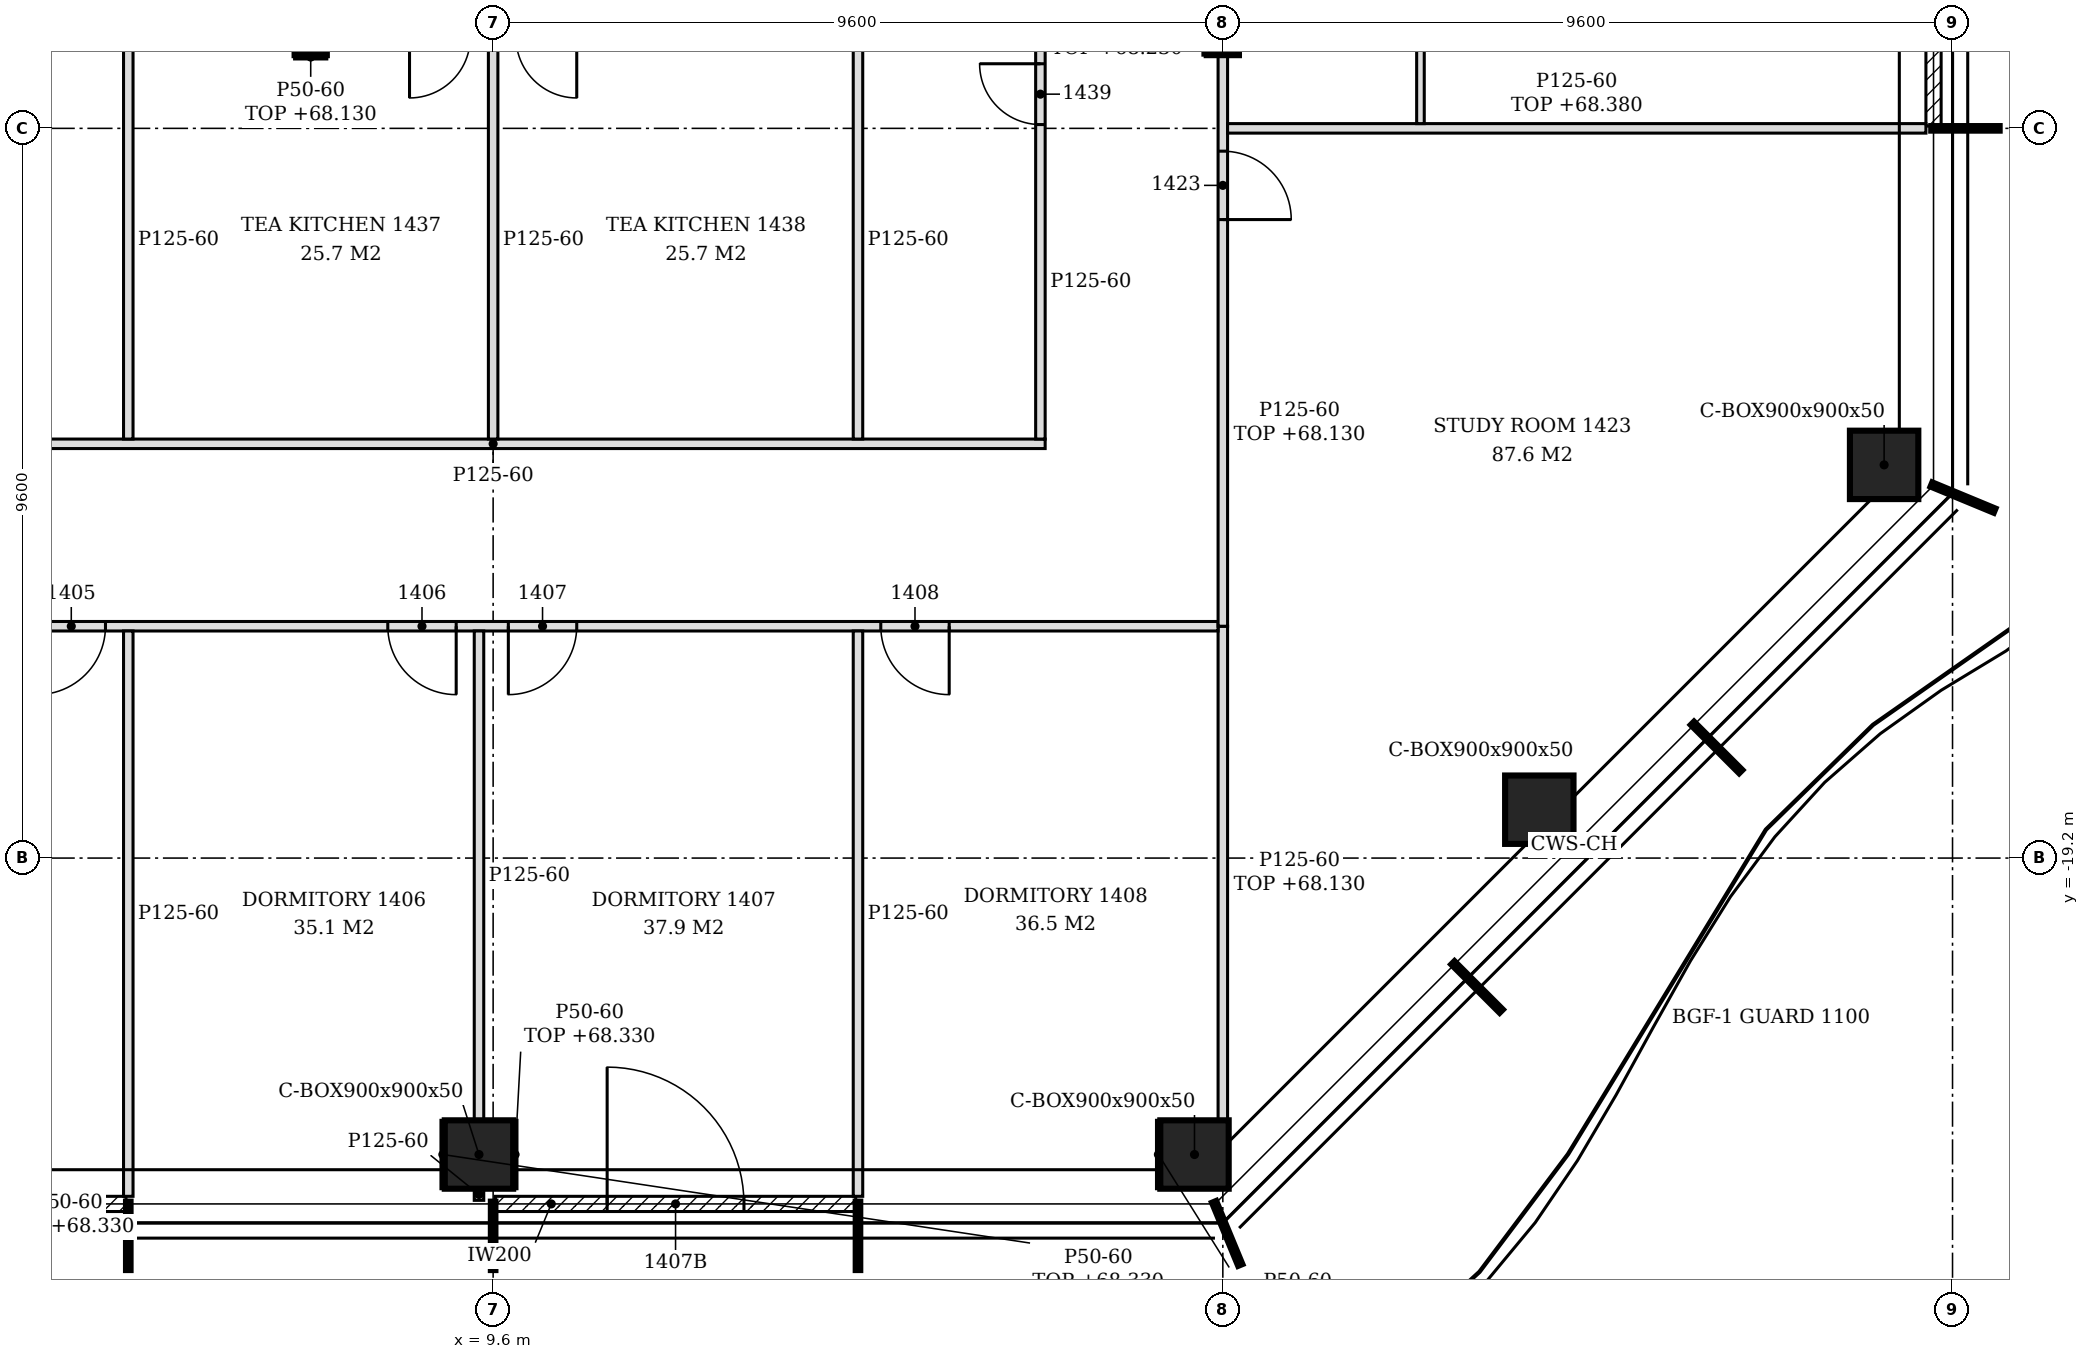
"""IFC4 building model, lengths in metres.
Left out: names, types, materials, properties, quantities, classifications, styles, units other than length and angle.
Written with IfcOpenShell. Run it as: python <this file> out.ifc"""

import sys

from ifc_helpers import new_model, si_unit, direction, frame, frame_2d, origin, origin_2d, place, context, subcontext, project, spatial, polyline, rectangle, hollow_rectangle, i_section, outline, extrude, element, fill, save


model = new_model("IFC4")
c1 = context("Model", 3, precision=1e-05, world=origin(), true_north=direction((0.0, 1.0)))
c2 = subcontext(c1, "Body", "Model", "MODEL_VIEW")
j1 = project(units=[si_unit("LENGTHUNIT", "METRE"), si_unit("PLANEANGLEUNIT", "RADIAN")], contexts=[c1])
p1 = place(None, origin())
s1 = spatial("IfcSite", under=j1, at=p1, CompositionType="ELEMENT")
p2 = place(p1, origin())
s2 = spatial("IfcBuilding", under=s1, at=p2, CompositionType="ELEMENT")
p3 = place(p2, frame((0.0, 0.0, 65.4)))
s3 = spatial("IfcBuildingStorey", under=s2, at=p3, CompositionType="ELEMENT", Elevation=65.4)
for number, where, z_axis, x_axis in (
    (1, (9.414, -23.1, -0.15), (0.0, 0.0, 1.0), (1.0, 0.0, 0.0)),
    (2, (18.827, -23.1, -0.15), (0.0, 0.0, 1.0), (1.0, 0.0, 0.0)),
    (3, (23.364, -18.564, -0.15), (0.0, 0.0, 1.0), (1.0, 0.0, 0.0)),
    (4, (27.9, -14.027, -0.15), (0.0, 0.0, 1.0), (1.0, 0.0, 0.0)),
):
    element("IfcColumn", number, at=place(p3, frame(where, z_axis=z_axis, x_axis=x_axis)), inside=s3, PredefinedType="COLUMN", context=c2, shape_type="SweptSolid", body=[
        extrude(hollow_rectangle(XDim=0.9, YDim=0.9, WallThickness=0.05, at=origin_2d()), origin(), (0.0, 0.0, 1.0), 3.6),
    ])
for number, where, z_axis, x_axis in (
    (5, (7.2, -8.4, -0.15), (0.0, 0.0, 1.0), (1.0, 0.0, 0.0)),
    (6, (19.2, -8.4, -0.15), (0.0, 0.0, 1.0), (1.0, 0.0, 0.0)),
):
    element("IfcColumn", number, at=place(p3, frame(where, z_axis=z_axis, x_axis=x_axis)), inside=s3, PredefinedType="COLUMN", context=c2, shape_type="SweptSolid", body=[
        extrude(i_section(OverallWidth=0.424, OverallDepth=0.474, WebThickness=0.048, FlangeThickness=0.077, FilletRadius=0.015, at=origin_2d()), origin(), (0.0, 0.0, 1.0), 3.6),
    ])
p4 = place(p3, frame((0.03, -23.75, 0.0), z_axis=(0.0, 0.0, 1.0), x_axis=(1.0, 0.0, 0.0)))
e7 = element("IfcWall", 7, at=p4, inside=s3, PredefinedType="NOTDEFINED", context=c2, shape_type="SweptSolid", body=[
    extrude(rectangle(XDim=4.74, YDim=0.2, at=frame_2d((2.37, 0.0))), origin(), (0.0, 0.0, 1.0), 3.45),
])
p5 = place(p4, frame((1.47, 0.0, 0.0)))
e8 = element("IfcOpeningElement", 8, at=p5, cuts=e7, PredefinedType="OPENING", context=c2, shape_type="SweptSolid", body=[
    extrude(rectangle(XDim=1.8, YDim=2.4, at=frame_2d((0.9, 1.2))), frame((0.0, 0.11, 0.0), z_axis=(0.0, -1.0, 0.0), x_axis=(1.0, 0.0, 0.0)), (0.0, 0.0, 1.0), 0.22),
])
p6 = place(p3, frame((9.63, -23.75, 0.0), z_axis=(0.0, 0.0, 1.0), x_axis=(1.0, 0.0, 0.0)))
e9 = element("IfcWall", 9, at=p6, inside=s3, PredefinedType="NOTDEFINED", context=c2, shape_type="SweptSolid", body=[
    extrude(rectangle(XDim=4.74, YDim=0.2, at=frame_2d((2.37, 0.0))), origin(), (0.0, 0.0, 1.0), 3.45),
])
p7 = place(p6, frame((1.47, 0.0, 0.0)))
e10 = element("IfcOpeningElement", 10, at=p7, cuts=e9, PredefinedType="OPENING", context=c2, shape_type="SweptSolid", body=[
    extrude(rectangle(XDim=1.8, YDim=2.4, at=frame_2d((0.9, 1.2))), frame((0.0, 0.11, 0.0), z_axis=(0.0, -1.0, 0.0), x_axis=(1.0, 0.0, 0.0)), (0.0, 0.0, 1.0), 0.22),
])
p8 = place(p3, frame((28.55, -9.57, 0.0), z_axis=(0.0, 0.0, 1.0), x_axis=(0.0, 1.0, 0.0)))
e11 = element("IfcWall", 11, at=p8, inside=s3, PredefinedType="NOTDEFINED", context=c2, shape_type="SweptSolid", body=[
    extrude(rectangle(XDim=4.74, YDim=0.2, at=frame_2d((2.37, 0.0))), origin(), (0.0, 0.0, 1.0), 3.45),
])
p9 = place(p8, frame((1.17, 0.0, 0.0)))
e12 = element("IfcOpeningElement", 12, at=p9, cuts=e11, PredefinedType="OPENING", context=c2, shape_type="SweptSolid", body=[
    extrude(rectangle(XDim=2.4, YDim=2.4, at=frame_2d((1.2, 1.2))), frame((0.0, 0.11, 0.0), z_axis=(0.0, -1.0, 0.0), x_axis=(1.0, 0.0, 0.0)), (0.0, 0.0, 1.0), 0.22),
])
p10 = place(p3, frame((4.8, -23.65, 0.0), z_axis=(0.0, 0.0, 1.0), x_axis=(0.0, 1.0, 0.0)))
e13 = element("IfcWall", 13, at=p10, inside=s3, PredefinedType="PARTITIONING", context=c2, shape_type="SweptSolid", body=[
    extrude(outline(polyline([(0.0, 0.0), (7.438, 0.0), (7.438, 3.45), (4.555, 3.45), (4.553, 2.88), (4.345, 2.88), (4.343, 3.45), (0.7, 3.45), (0.698, 2.93), (0.4, 2.93), (0.398, 3.45), (0.0, 3.45), (0.0, 0.0)])), frame((0.0, 0.062, 0.0), z_axis=(0.0, -1.0, 0.0), x_axis=(1.0, 0.0, 0.0)), (0.0, 0.0, 1.0), 0.125),
])
p11 = place(p3, frame((9.414, -23.703, 0.0), z_axis=(0.0, 0.0, 1.0), x_axis=(0.0, 1.0, 0.0)))
e14 = element("IfcWall", 14, at=p11, inside=s3, PredefinedType="PARTITIONING", context=c2, shape_type="SweptSolid", body=[
    extrude(rectangle(XDim=0.153, YDim=0.125, at=frame_2d((0.076, 0.0))), origin(), (0.0, 0.0, 1.0), 3.45),
])
p12 = place(p3, frame((14.4, -23.65, 0.0), z_axis=(0.0, 0.0, 1.0), x_axis=(0.0, 1.0, 0.0)))
e15 = element("IfcWall", 15, at=p12, inside=s3, PredefinedType="PARTITIONING", context=c2, shape_type="SweptSolid", body=[
    extrude(outline(polyline([(0.0, 0.0), (7.438, 0.0), (7.438, 3.45), (4.555, 3.45), (4.553, 2.88), (4.345, 2.88), (4.343, 3.45), (0.7, 3.45), (0.698, 2.93), (0.4, 2.93), (0.398, 3.45), (0.0, 3.45), (0.0, 0.0)])), frame((0.0, 0.062, 0.0), z_axis=(0.0, -1.0, 0.0), x_axis=(1.0, 0.0, 0.0)), (0.0, 0.0, 1.0), 0.125),
])
p13 = place(p3, frame((9.414, -22.65, 0.0), z_axis=(0.0, 0.0, 1.0), x_axis=(0.0, 1.0, 0.0)))
e16 = element("IfcWall", 16, at=p13, inside=s3, PredefinedType="PARTITIONING", context=c2, shape_type="SweptSolid", body=[
    extrude(outline(polyline([(0.0, 0.0), (6.438, 0.0), (6.438, 3.45), (3.555, 3.45), (3.553, 2.88), (3.345, 2.88), (3.343, 3.45), (0.0, 3.45), (0.0, 0.0)])), frame((0.0, 0.062, 0.0), z_axis=(0.0, -1.0, 0.0), x_axis=(1.0, 0.0, 0.0)), (0.0, 0.0, 1.0), 0.125),
])
p14 = place(p3, frame((19.2, -22.65, 0.0), z_axis=(0.0, 0.0, 1.0), x_axis=(0.0, 1.0, 0.0)))
e17 = element("IfcWall", 17, at=p14, inside=s3, PredefinedType="PARTITIONING", context=c2, shape_type="SweptSolid", body=[
    extrude(outline(polyline([(0.0, 0.0), (6.5, 0.0), (6.5, 2.73), (0.48, 2.73), (0.478, 2.63), (0.0, 2.63), (0.0, 0.0)])), frame((0.0, 0.062, 0.0), z_axis=(0.0, -1.0, 0.0), x_axis=(1.0, 0.0, 0.0)), (0.0, 0.0, 1.0), 0.125),
])
p15 = place(p3, frame((-22.55, -16.15, 0.0), z_axis=(0.0, 0.0, 1.0), x_axis=(1.0, 0.0, 0.0)))
e18 = element("IfcWall", 18, at=p15, inside=s3, PredefinedType="PARTITIONING", context=c2, shape_type="SweptSolid", body=[
    extrude(outline(polyline([(0.0, 0.0), (41.688, 0.0), (41.688, 2.73), (41.6, 2.73), (41.598, 3.45), (29.9, 3.45), (29.898, 2.73), (29.6, 2.73), (29.598, 3.45), (17.9, 3.45), (17.898, 2.73), (17.6, 2.73), (17.598, 3.45), (8.3, 3.45), (8.298, 2.93), (8.0, 2.93), (7.998, 3.45), (0.0, 3.45), (0.0, 0.0)])), frame((0.0, 0.062, 0.0), z_axis=(0.0, -1.0, 0.0), x_axis=(1.0, 0.0, 0.0)), (0.0, 0.0, 1.0), 0.125),
])
p16 = place(p15, frame((6.95, 0.0, 0.0)))
e19 = element("IfcOpeningElement", 19, at=p16, cuts=e18, PredefinedType="OPENING", context=c2, shape_type="SweptSolid", body=[
    extrude(rectangle(XDim=0.9, YDim=2.1, at=frame_2d((0.45, 1.05))), frame((0.0, 0.073, 0.0), z_axis=(0.0, -1.0, 0.0), x_axis=(1.0, 0.0, 0.0)), (0.0, 0.0, 1.0), 0.145),
])
p17 = place(p15, frame((11.936, 0.0, 0.0)))
e20 = element("IfcOpeningElement", 20, at=p17, cuts=e18, PredefinedType="OPENING", context=c2, shape_type="SweptSolid", body=[
    extrude(rectangle(XDim=0.9, YDim=2.1, at=frame_2d((0.45, 1.05))), frame((0.0, 0.073, 0.0), z_axis=(0.0, -1.0, 0.0), x_axis=(1.0, 0.0, 0.0)), (0.0, 0.0, 1.0), 0.145),
])
p18 = place(p15, frame((16.55, 0.0, 0.0)))
e21 = element("IfcOpeningElement", 21, at=p18, cuts=e18, PredefinedType="OPENING", context=c2, shape_type="SweptSolid", body=[
    extrude(rectangle(XDim=0.9, YDim=2.1, at=frame_2d((0.45, 1.05))), frame((0.0, 0.073, 0.0), z_axis=(0.0, -1.0, 0.0), x_axis=(1.0, 0.0, 0.0)), (0.0, 0.0, 1.0), 0.145),
])
p19 = place(p15, frame((21.35, 0.0, 0.0)))
e22 = element("IfcOpeningElement", 22, at=p19, cuts=e18, PredefinedType="OPENING", context=c2, shape_type="SweptSolid", body=[
    extrude(rectangle(XDim=0.9, YDim=2.1, at=frame_2d((0.45, 1.05))), frame((0.0, 0.073, 0.0), z_axis=(0.0, -1.0, 0.0), x_axis=(1.0, 0.0, 0.0)), (0.0, 0.0, 1.0), 0.145),
])
p20 = place(p15, frame((26.15, 0.0, 0.0)))
e23 = element("IfcOpeningElement", 23, at=p20, cuts=e18, PredefinedType="OPENING", context=c2, shape_type="SweptSolid", body=[
    extrude(rectangle(XDim=0.9, YDim=2.1, at=frame_2d((0.45, 1.05))), frame((0.0, 0.073, 0.0), z_axis=(0.0, -1.0, 0.0), x_axis=(1.0, 0.0, 0.0)), (0.0, 0.0, 1.0), 0.145),
])
p21 = place(p15, frame((30.764, 0.0, 0.0)))
e24 = element("IfcOpeningElement", 24, at=p21, cuts=e18, PredefinedType="OPENING", context=c2, shape_type="SweptSolid", body=[
    extrude(rectangle(XDim=0.9, YDim=2.1, at=frame_2d((0.45, 1.05))), frame((0.0, 0.073, 0.0), z_axis=(0.0, -1.0, 0.0), x_axis=(1.0, 0.0, 0.0)), (0.0, 0.0, 1.0), 0.145),
])
p22 = place(p15, frame((32.35, 0.0, 0.0)))
e25 = element("IfcOpeningElement", 25, at=p22, cuts=e18, PredefinedType="OPENING", context=c2, shape_type="SweptSolid", body=[
    extrude(rectangle(XDim=0.9, YDim=2.1, at=frame_2d((0.45, 1.05))), frame((0.0, 0.073, 0.0), z_axis=(0.0, -1.0, 0.0), x_axis=(1.0, 0.0, 0.0)), (0.0, 0.0, 1.0), 0.145),
])
p23 = place(p15, frame((37.25, 0.0, 0.0)))
e26 = element("IfcOpeningElement", 26, at=p23, cuts=e18, PredefinedType="OPENING", context=c2, shape_type="SweptSolid", body=[
    extrude(rectangle(XDim=0.9, YDim=2.1, at=frame_2d((0.45, 1.05))), frame((0.0, 0.073, 0.0), z_axis=(0.0, -1.0, 0.0), x_axis=(1.0, 0.0, 0.0)), (0.0, 0.0, 1.0), 0.145),
])
p24 = place(p3, frame((19.2, -16.15, 0.0), z_axis=(0.0, 0.0, 1.0), x_axis=(0.0, 1.0, 0.0)))
e27 = element("IfcWall", 27, at=p24, inside=s3, PredefinedType="PARTITIONING", context=c2, shape_type="SweptSolid", body=[
    extrude(rectangle(XDim=7.513, YDim=0.125, at=frame_2d((3.756, 0.0))), origin(), (0.0, 0.0, 1.0), 2.73),
])
p25 = place(p24, frame((5.35, 0.0, 0.0)))
e28 = element("IfcOpeningElement", 28, at=p25, cuts=e27, PredefinedType="OPENING", context=c2, shape_type="SweptSolid", body=[
    extrude(rectangle(XDim=0.9, YDim=2.1, at=frame_2d((0.45, 1.05))), frame((0.0, 0.073, 0.0), z_axis=(0.0, -1.0, 0.0), x_axis=(1.0, 0.0, 0.0)), (0.0, 0.0, 1.0), 0.145),
])
p26 = place(p3, frame((2.337, -13.75, 0.0), z_axis=(0.0, 0.0, 1.0), x_axis=(1.0, 0.0, 0.0)))
e29 = element("IfcWall", 29, at=p26, inside=s3, PredefinedType="PARTITIONING", context=c2, shape_type="SweptSolid", body=[
    extrude(outline(polyline([(0.0, 0.0), (14.525, 0.0), (14.525, 3.45), (5.012, 3.45), (5.01, 2.73), (4.712, 2.73), (4.71, 3.45), (0.0, 3.45), (0.0, 0.0)])), frame((0.0, 0.062, 0.0), z_axis=(0.0, -1.0, 0.0), x_axis=(1.0, 0.0, 0.0)), (0.0, 0.0, 1.0), 0.125),
])
for number, where, z_axis, x_axis in (
    (30, (4.8, -13.688, 0.0), (0.0, 0.0, 1.0), (0.0, 1.0, 0.0)),
    (31, (9.6, -13.688, 0.0), (0.0, 0.0, 1.0), (0.0, 1.0, 0.0)),
    (32, (14.4, -13.688, 0.0), (0.0, 0.0, 1.0), (0.0, 1.0, 0.0)),
):
    element("IfcWall", number, at=place(p3, frame(where, z_axis=z_axis, x_axis=x_axis)), inside=s3, PredefinedType="PARTITIONING", context=c2, shape_type="SweptSolid", body=[
        extrude(outline(polyline([(0.0, 0.0), (5.225, 0.0), (5.225, 2.83), (5.137, 2.83), (5.135, 3.45), (0.0, 3.45), (0.0, 0.0)])), frame((0.0, 0.062, 0.0), z_axis=(0.0, -1.0, 0.0), x_axis=(1.0, 0.0, 0.0)), (0.0, 0.0, 1.0), 0.125),
    ])
p27 = place(p3, frame((16.8, -13.688, 0.0), z_axis=(0.0, 0.0, 1.0), x_axis=(0.0, 1.0, 0.0)))
e33 = element("IfcWall", 33, at=p27, inside=s3, PredefinedType="PARTITIONING", context=c2, shape_type="SweptSolid", body=[
    extrude(outline(polyline([(0.0, 0.0), (5.225, 0.0), (5.225, 2.83), (5.137, 2.83), (5.135, 3.45), (0.0, 3.45), (0.0, 0.0)])), frame((0.0, 0.062, 0.0), z_axis=(0.0, -1.0, 0.0), x_axis=(1.0, 0.0, 0.0)), (0.0, 0.0, 1.0), 0.125),
])
p28 = place(p27, frame((4.137, 0.0, 0.0)))
e34 = element("IfcOpeningElement", 34, at=p28, cuts=e33, PredefinedType="OPENING", context=c2, shape_type="SweptSolid", body=[
    extrude(rectangle(XDim=0.8, YDim=2.1, at=frame_2d((0.4, 1.05))), frame((0.0, 0.073, 0.0), z_axis=(0.0, -1.0, 0.0), x_axis=(1.0, 0.0, 0.0)), (0.0, 0.0, 1.0), 0.145),
])
p29 = place(p3, frame((19.262, -9.6, 0.0), z_axis=(0.0, 0.0, 1.0), x_axis=(1.0, 0.0, 0.0)))
e35 = element("IfcWall", 35, at=p29, inside=s3, PredefinedType="PARTITIONING", context=c2, shape_type="SweptSolid", body=[
    extrude(outline(polyline([(0.0, 0.0), (9.188, 0.0), (9.188, 2.98), (8.788, 2.98), (8.785, 2.93), (8.488, 2.93), (8.486, 2.98), (0.087, 2.98), (0.085, 2.73), (0.0, 2.73), (0.0, 0.0)])), frame((0.0, 0.062, 0.0), z_axis=(0.0, -1.0, 0.0), x_axis=(1.0, 0.0, 0.0)), (0.0, 0.0, 1.0), 0.125),
])
p30 = place(p3, frame((21.8, -9.538, 0.0), z_axis=(0.0, 0.0, 1.0), x_axis=(0.0, 1.0, 0.0)))
e36 = element("IfcWall", 36, at=p30, inside=s3, PredefinedType="PARTITIONING", context=c2, shape_type="SweptSolid", body=[
    extrude(outline(polyline([(0.0, 0.0), (2.288, 0.0), (2.288, 3.45), (0.032, 3.45), (0.031, 2.98), (0.0, 2.98), (0.0, 0.0)])), frame((0.0, 0.05, 0.0), z_axis=(0.0, -1.0, 0.0), x_axis=(1.0, 0.0, 0.0)), (0.0, 0.0, 1.0), 0.1),
])
for number, where, z_axis, x_axis in (
    (37, (8.939, -23.55, 0.0), (0.0, 0.0, 1.0), (0.0, 1.0, 0.0)),
    (38, (9.889, -23.55, 0.0), (0.0, 0.0, 1.0), (0.0, 1.0, 0.0)),
    (39, (18.352, -23.55, 0.0), (0.0, 0.0, 1.0), (0.0, 1.0, 0.0)),
):
    element("IfcWall", number, at=place(p3, frame(where, z_axis=z_axis, x_axis=x_axis)), inside=s3, PredefinedType="PARTITIONING", context=c2, shape_type="SweptSolid", body=[
        extrude(rectangle(XDim=0.9, YDim=0.05, at=frame_2d((0.45, 0.0))), origin(), (0.0, 0.0, 1.0), 2.93),
    ])
p31 = place(p3, frame((18.963, -8.637, 0.0), z_axis=(0.0, 0.0, 1.0), x_axis=(0.0, 1.0, 0.0)))
e40 = element("IfcWall", 40, at=p31, inside=s3, PredefinedType="PARTITIONING", context=c2, shape_type="SweptSolid", body=[
    extrude(rectangle(XDim=0.474, YDim=0.05, at=frame_2d((0.237, 0.0))), origin(), (0.0, 0.0, 1.0), 2.83),
])
p32 = place(p3, frame((6.988, -8.662, 0.0), z_axis=(0.0, 0.0, 1.0), x_axis=(1.0, 0.0, 0.0)))
e41 = element("IfcWall", 41, at=p32, inside=s3, PredefinedType="PARTITIONING", context=c2, shape_type="SweptSolid", body=[
    extrude(rectangle(XDim=0.424, YDim=0.05, at=frame_2d((0.212, 0.0))), origin(), (0.0, 0.0, 1.0), 2.73),
])
p33 = place(p7, origin())
e42 = element("IfcDoor", 42, at=p33, inside=s3, OperationType="SINGLE_SWING_LEFT", PredefinedType="DOOR", context=c2, shape_type="SweptSolid", body=[
    extrude(rectangle(XDim=1.8, YDim=2.4, at=frame_2d((0.9, 1.2))), frame((0.0, 0.025, 0.0), z_axis=(0.0, -1.0, 0.0), x_axis=(1.0, 0.0, 0.0)), (0.0, 0.0, 1.0), 0.05),
])
fill(e10, e42)
p34 = place(p20, frame((0.9, 0.0, 0.0), z_axis=(0.0, 0.0, 1.0), x_axis=(-1.0, 0.0, 0.0)))
e43 = element("IfcDoor", 43, at=p34, inside=s3, OperationType="SINGLE_SWING_RIGHT", PredefinedType="DOOR", context=c2, shape_type="SweptSolid", body=[
    extrude(rectangle(XDim=0.9, YDim=2.1, at=frame_2d((0.45, 1.05))), frame((0.0, 0.025, 0.0), z_axis=(0.0, -1.0, 0.0), x_axis=(1.0, 0.0, 0.0)), (0.0, 0.0, 1.0), 0.05),
])
fill(e23, e43)
p35 = place(p21, frame((0.9, 0.0, 0.0), z_axis=(0.0, 0.0, 1.0), x_axis=(-1.0, 0.0, 0.0)))
e44 = element("IfcDoor", 44, at=p35, inside=s3, OperationType="SINGLE_SWING_LEFT", PredefinedType="DOOR", context=c2, shape_type="SweptSolid", body=[
    extrude(rectangle(XDim=0.9, YDim=2.1, at=frame_2d((0.45, 1.05))), frame((0.0, 0.025, 0.0), z_axis=(0.0, -1.0, 0.0), x_axis=(1.0, 0.0, 0.0)), (0.0, 0.0, 1.0), 0.05),
])
fill(e24, e44)
p36 = place(p22, frame((0.9, 0.0, 0.0), z_axis=(0.0, 0.0, 1.0), x_axis=(-1.0, 0.0, 0.0)))
e45 = element("IfcDoor", 45, at=p36, inside=s3, OperationType="SINGLE_SWING_RIGHT", PredefinedType="DOOR", context=c2, shape_type="SweptSolid", body=[
    extrude(rectangle(XDim=0.9, YDim=2.1, at=frame_2d((0.45, 1.05))), frame((0.0, 0.025, 0.0), z_axis=(0.0, -1.0, 0.0), x_axis=(1.0, 0.0, 0.0)), (0.0, 0.0, 1.0), 0.05),
])
fill(e25, e45)
p37 = place(p23, frame((0.9, 0.0, 0.0), z_axis=(0.0, 0.0, 1.0), x_axis=(-1.0, 0.0, 0.0)))
e46 = element("IfcDoor", 46, at=p37, inside=s3, OperationType="SINGLE_SWING_LEFT", PredefinedType="DOOR", context=c2, shape_type="SweptSolid", body=[
    extrude(rectangle(XDim=0.9, YDim=2.1, at=frame_2d((0.45, 1.05))), frame((0.0, 0.025, 0.0), z_axis=(0.0, -1.0, 0.0), x_axis=(1.0, 0.0, 0.0)), (0.0, 0.0, 1.0), 0.05),
])
fill(e26, e46)
p38 = place(p25, frame((0.9, 0.0, 0.0), z_axis=(0.0, 0.0, 1.0), x_axis=(-1.0, 0.0, 0.0)))
e47 = element("IfcDoor", 47, at=p38, inside=s3, OperationType="SINGLE_SWING_RIGHT", PredefinedType="DOOR", context=c2, shape_type="SweptSolid", body=[
    extrude(rectangle(XDim=0.9, YDim=2.1, at=frame_2d((0.45, 1.05))), frame((0.0, 0.025, 0.0), z_axis=(0.0, -1.0, 0.0), x_axis=(1.0, 0.0, 0.0)), (0.0, 0.0, 1.0), 0.05),
])
fill(e28, e47)
p39 = place(p28, origin())
e48 = element("IfcDoor", 48, at=p39, inside=s3, OperationType="SINGLE_SWING_RIGHT", PredefinedType="DOOR", context=c2, shape_type="SweptSolid", body=[
    extrude(rectangle(XDim=0.8, YDim=2.1, at=frame_2d((0.4, 1.05))), frame((0.0, 0.025, 0.0), z_axis=(0.0, -1.0, 0.0), x_axis=(1.0, 0.0, 0.0)), (0.0, 0.0, 1.0), 0.05),
])
fill(e34, e48)
save(model, sys.argv[1])
